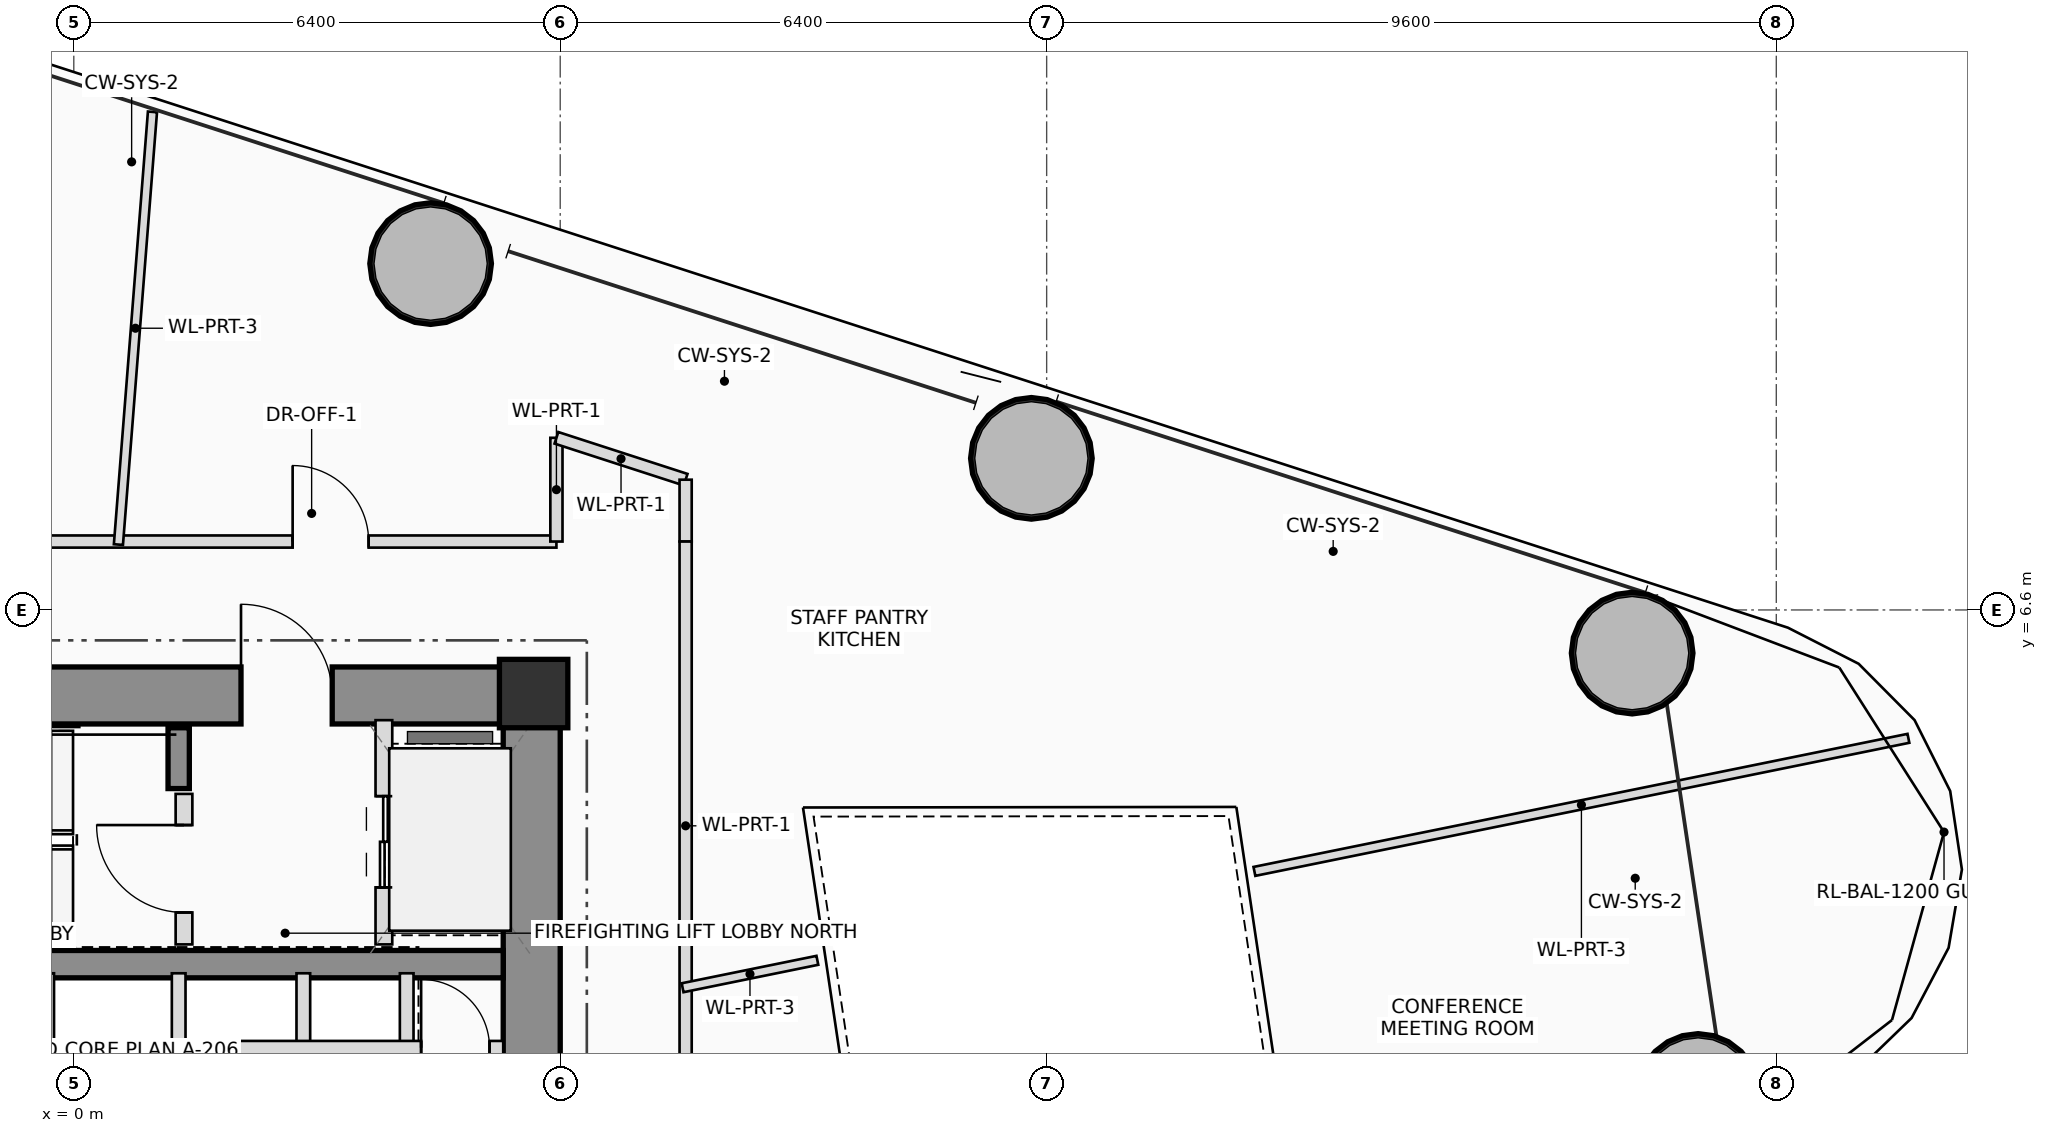
"""IFC4 building model, lengths in metres.
Left out: names, types, materials, properties, quantities, classifications, styles, units other than length and angle.
Written with IfcOpenShell. Run it as: python <this file> out.ifc"""

import sys

from ifc_helpers import new_model, si_unit, direction, frame, frame_2d, origin, origin_2d, place, context, subcontext, project, spatial, rectangle, hollow_circle, extrude, source, transform, mapped, element, fill, save


model = new_model("IFC4")
c1 = context("Model", 3, precision=1e-05, world=origin(), true_north=direction((0.0, 1.0)))
c2 = subcontext(c1, "Body", "Model", "MODEL_VIEW")
j1 = project(units=[si_unit("LENGTHUNIT", "METRE"), si_unit("PLANEANGLEUNIT", "RADIAN")], contexts=[c1])
p1 = place(None, origin())
s1 = spatial("IfcSite", under=j1, at=p1, CompositionType="ELEMENT")
p2 = place(p1, origin())
s2 = spatial("IfcBuilding", under=s1, at=p2, CompositionType="ELEMENT")
p3 = place(p2, frame((0.0, 0.0, 58.55)))
s3 = spatial("IfcBuildingStorey", under=s2, at=p3, CompositionType="ELEMENT", Elevation=58.55)
m1 = source(origin(), c2, "Body", "SweptSolid", [
    extrude(rectangle(XDim=0.9, YDim=0.9, at=origin_2d()), origin(), (0.0, 0.0, 1.0), 3.75),
])
p4 = place(p3, frame((6.05, 5.5, 0.0), z_axis=(0.0, 0.0, 1.0), x_axis=(1.0, 0.0, 0.0)))
e1 = element("IfcColumn", 1, at=p4, inside=s3, PredefinedType="COLUMN", context=c2, shape_type="MappedRepresentation", body=[
    mapped(m1, transform((0.0, 0.0, 0.0), scale=1.0)),
])
p5 = place(p3, frame((-6.4, 5.475, 0.0), z_axis=(0.0, 0.0, 1.0), x_axis=(1.0, 0.0, 0.0)))
e2 = element("IfcWall", 2, at=p5, inside=s3, PredefinedType="SHEAR", context=c2, shape_type="SweptSolid", body=[
    extrude(rectangle(XDim=12.8, YDim=0.75, at=frame_2d((6.4, 0.0))), origin(), (0.0, 0.0, 1.0), 3.75),
])
p6 = place(p5, frame((8.6, 0.0, 0.0)))
e3 = element("IfcOpeningElement", 3, at=p6, cuts=e2, PredefinedType="OPENING", context=c2, shape_type="SweptSolid", body=[
    extrude(rectangle(XDim=1.2, YDim=2.2, at=frame_2d((0.6, 1.1))), frame((0.0, 0.385, 0.0), z_axis=(0.0, -1.0, 0.0), x_axis=(1.0, 0.0, 0.0)), (0.0, 0.0, 1.0), 0.77),
])
p7 = place(p3, frame((6.025, -5.1, 0.0), z_axis=(0.0, 0.0, 1.0), x_axis=(0.0, 1.0, 0.0)))
e4 = element("IfcWall", 4, at=p7, inside=s3, PredefinedType="SHEAR", context=c2, shape_type="SweptSolid", body=[
    extrude(rectangle(XDim=10.2, YDim=0.75, at=frame_2d((5.1, 0.0))), origin(), (0.0, 0.0, 1.0), 3.75),
])
p8 = place(p3, frame((-5.65, 1.94, 0.0), z_axis=(0.0, 0.0, 1.0), x_axis=(1.0, 0.0, 0.0)))
e5 = element("IfcWall", 5, at=p8, inside=s3, PredefinedType="SHEAR", context=c2, shape_type="SweptSolid", body=[
    extrude(rectangle(XDim=11.3, YDim=0.36, at=frame_2d((5.65, 0.0))), origin(), (0.0, 0.0, 1.0), 3.75),
])
p9 = place(p3, frame((1.38, 4.25, 0.0), z_axis=(0.0, 0.0, 1.0), x_axis=(0.0, 1.0, 0.0)))
e6 = element("IfcWall", 6, at=p9, inside=s3, PredefinedType="SHEAR", context=c2, shape_type="SweptSolid", body=[
    extrude(rectangle(XDim=0.8, YDim=0.28, at=frame_2d((0.4, 0.0))), origin(), (0.0, 0.0, 1.0), 3.75),
])
m2 = source(origin(), c2, "Body", "SweptSolid", [
    extrude(hollow_circle(Radius=0.8, WallThickness=0.055, at=origin_2d()), origin(), (0.0, 0.0, 1.0), 3.75),
])
for number, where, z_axis, x_axis in (
    (7, (21.371, 0.226, 0.0), (0.0, 0.0, 1.0), (1.0, 0.0, 0.0)),
    (8, (20.503, 6.032, 0.0), (0.0, 0.0, 1.0), (1.0, 0.0, 0.0)),
    (9, (12.599, 8.594, 0.0), (0.0, 0.0, 1.0), (1.0, 0.0, 0.0)),
    (10, (4.695, 11.157, 0.0), (0.0, 0.0, 1.0), (1.0, 0.0, 0.0)),
):
    element("IfcColumn", number, at=place(p3, frame(where, z_axis=z_axis, x_axis=x_axis)), inside=s3, PredefinedType="COLUMN", context=c2, shape_type="MappedRepresentation", body=[
        mapped(m2, transform((0.0, 0.0, 0.0), scale=1.0)),
    ])
p10 = place(p3, frame((1.45, 2.2, 0.0), z_axis=(0.0, 0.0, 1.0), x_axis=(0.0, 1.0, 0.0)))
e11 = element("IfcWall", 11, at=p10, inside=s3, PredefinedType="PLUMBINGWALL", context=c2, shape_type="SweptSolid", body=[
    extrude(rectangle(XDim=1.98, YDim=0.22, at=frame_2d((0.99, 0.0))), origin(), (0.0, 0.0, 1.0), 3.545),
])
p11 = place(p10, frame((0.42, 0.0, 0.0)))
e12 = element("IfcOpeningElement", 12, at=p11, cuts=e11, PredefinedType="OPENING", context=c2, shape_type="SweptSolid", body=[
    extrude(rectangle(XDim=1.15, YDim=2.15, at=frame_2d((0.575, 1.075))), frame((0.0, 0.12, 0.0), z_axis=(0.0, -1.0, 0.0), x_axis=(1.0, 0.0, 0.0)), (0.0, 0.0, 1.0), 0.24),
])
p12 = place(p3, frame((4.08, 2.2, 0.0), z_axis=(0.0, 0.0, 1.0), x_axis=(0.0, 1.0, 0.0)))
e13 = element("IfcWall", 13, at=p12, inside=s3, PredefinedType="PLUMBINGWALL", context=c2, shape_type="SweptSolid", body=[
    extrude(rectangle(XDim=2.95, YDim=0.22, at=frame_2d((1.475, 0.0))), origin(), (0.0, 0.0, 1.0), 3.545),
])
p13 = place(p12, frame((0.75, 0.0, 0.0)))
e14 = element("IfcOpeningElement", 14, at=p13, cuts=e13, PredefinedType="OPENING", context=c2, shape_type="SweptSolid", body=[
    extrude(rectangle(XDim=1.2, YDim=2.25, at=frame_2d((0.6, 1.125))), frame((0.0, 0.12, 0.0), z_axis=(0.0, -1.0, 0.0), x_axis=(1.0, 0.0, 0.0)), (0.0, 0.0, 1.0), 0.24),
])
for number, where, z_axis, x_axis in (
    (15, (-0.35, 0.84, 0.0), (0.0, 0.0, 1.0), (0.0, 1.0, 0.0)),
    (16, (1.38, 0.84, 0.0), (0.0, 0.0, 1.0), (0.0, 1.0, 0.0)),
    (17, (3.02, 0.84, 0.0), (0.0, 0.0, 1.0), (0.0, 1.0, 0.0)),
    (18, (4.38, 0.84, 0.0), (0.0, 0.0, 1.0), (0.0, 1.0, 0.0)),
):
    element("IfcWall", number, at=place(p3, frame(where, z_axis=z_axis, x_axis=x_axis)), inside=s3, PredefinedType="PLUMBINGWALL", context=c2, shape_type="SweptSolid", body=[
        extrude(rectangle(XDim=0.98, YDim=0.18, at=frame_2d((0.49, 0.0))), origin(), (0.0, 0.0, 1.0), 3.545),
    ])
p14 = place(p3, frame((-5.68, 0.84, 0.0), z_axis=(0.0, 0.0, 1.0), x_axis=(1.0, 0.0, 0.0)))
e19 = element("IfcWall", 19, at=p14, inside=s3, PredefinedType="PLUMBINGWALL", context=c2, shape_type="SweptSolid", body=[
    extrude(rectangle(XDim=11.33, YDim=0.18, at=frame_2d((5.665, 0.0))), origin(), (0.0, 0.0, 1.0), 3.545),
])
p15 = place(p14, frame((0.43, 0.0, 0.0)))
e20 = element("IfcOpeningElement", 20, at=p15, cuts=e19, PredefinedType="OPENING", context=c2, shape_type="SweptSolid", body=[
    extrude(rectangle(XDim=1.1, YDim=2.2, at=frame_2d((0.55, 1.1))), frame((0.0, 0.1, 0.0), z_axis=(0.0, -1.0, 0.0), x_axis=(1.0, 0.0, 0.0)), (0.0, 0.0, 1.0), 0.2),
])
p16 = place(p14, frame((2.13, 0.0, 0.0)))
e21 = element("IfcOpeningElement", 21, at=p16, cuts=e19, PredefinedType="OPENING", context=c2, shape_type="SweptSolid", body=[
    extrude(rectangle(XDim=1.1, YDim=2.2, at=frame_2d((0.55, 1.1))), frame((0.0, 0.1, 0.0), z_axis=(0.0, -1.0, 0.0), x_axis=(1.0, 0.0, 0.0)), (0.0, 0.0, 1.0), 0.2),
])
p17 = place(p14, frame((10.25, 0.0, 0.0)))
e22 = element("IfcOpeningElement", 22, at=p17, cuts=e19, PredefinedType="OPENING", context=c2, shape_type="SweptSolid", body=[
    extrude(rectangle(XDim=0.9, YDim=2.05, at=frame_2d((0.45, 1.025))), frame((0.0, 0.1, 0.0), z_axis=(0.0, -1.0, 0.0), x_axis=(1.0, 0.0, 0.0)), (0.0, 0.0, 1.0), 0.2),
])
p18 = place(p3, frame((-6.35, 7.5, 0.0), z_axis=(0.0, 0.0, 1.0), x_axis=(1.0, 0.0, 0.0)))
e23 = element("IfcWall", 23, at=p18, inside=s3, PredefinedType="PARTITIONING", context=c2, shape_type="SweptSolid", body=[
    extrude(rectangle(XDim=12.7, YDim=0.16, at=frame_2d((6.35, 0.0))), origin(), (0.0, 0.0, 1.0), 2.85),
])
p19 = place(p18, frame((9.229, 0.0, 0.0)))
e24 = element("IfcOpeningElement", 24, at=p19, cuts=e23, PredefinedType="OPENING", context=c2, shape_type="SweptSolid", body=[
    extrude(rectangle(XDim=1.0, YDim=2.25, at=frame_2d((0.5, 1.125))), frame((0.0, 0.09, 0.0), z_axis=(0.0, -1.0, 0.0), x_axis=(1.0, 0.0, 0.0)), (0.0, 0.0, 1.0), 0.18),
])
p20 = place(p3, frame((6.35, 7.5, 0.0), z_axis=(0.0, 0.0, 1.0), x_axis=(0.0, 1.0, 0.0)))
e25 = element("IfcWall", 25, at=p20, inside=s3, PredefinedType="PARTITIONING", context=c2, shape_type="SweptSolid", body=[
    extrude(rectangle(XDim=1.365, YDim=0.16, at=frame_2d((0.682, 0.0))), origin(), (0.0, 0.0, 1.0), 3.05),
])
p21 = place(p3, frame((6.35, 8.865, 0.0), z_axis=(0.0, 0.0, 1.0), x_axis=(0.951273733128, -0.308347668486, 0.0)))
e26 = element("IfcWall", 26, at=p21, inside=s3, PredefinedType="PARTITIONING", context=c2, shape_type="SweptSolid", body=[
    extrude(rectangle(XDim=1.787, YDim=0.16, at=frame_2d((0.894, 0.0))), origin(), (0.0, 0.0, 1.0), 3.2),
])
p22 = place(p3, frame((8.05, 8.314, 0.0), z_axis=(0.0, 0.0, 1.0), x_axis=(0.0, -1.0, 0.0)))
e27 = element("IfcWall", 27, at=p22, inside=s3, PredefinedType="PARTITIONING", context=c2, shape_type="SweptSolid", body=[
    extrude(rectangle(XDim=0.814, YDim=0.16, at=frame_2d((0.407, 0.0))), origin(), (0.0, 0.0, 1.0), 3.05),
])
p23 = place(p3, frame((8.05, 7.5, 0.0), z_axis=(0.0, 0.0, 1.0), x_axis=(0.0, -1.0, 0.0)))
e28 = element("IfcWall", 28, at=p23, inside=s3, PredefinedType="PARTITIONING", context=c2, shape_type="SweptSolid", body=[
    extrude(rectangle(XDim=7.48, YDim=0.16, at=frame_2d((3.74, 0.0))), origin(), (0.0, 0.0, 1.0), 2.85),
])
p24 = place(p3, frame((0.587, 7.46, 0.0), z_axis=(0.0, 0.0, 1.0), x_axis=(0.078455369282, 0.996917627004, 0.0)))
e29 = element("IfcWall", 29, at=p24, inside=s3, PredefinedType="PARTITIONING", context=c2, shape_type="SweptSolid", body=[
    extrude(rectangle(XDim=5.71, YDim=0.12, at=frame_2d((2.855, 0.0))), origin(), (0.0, 0.0, 1.0), 3.01),
])
p25 = place(p3, frame((8.01, 1.63, 0.0), z_axis=(0.0, 0.0, 1.0), x_axis=(0.979916112173, 0.199410162989, 0.0)))
e30 = element("IfcWall", 30, at=p25, inside=s3, PredefinedType="PARTITIONING", context=c2, shape_type="SweptSolid", body=[
    extrude(rectangle(XDim=1.81, YDim=0.12, at=frame_2d((0.905, 0.0))), origin(), (0.0, 0.0, 1.0), 3.21),
])
p26 = place(p3, frame((15.533, 3.16, 0.0), z_axis=(0.0, 0.0, 1.0), x_axis=(0.979928377953, 0.199349878562, 0.0)))
e31 = element("IfcWall", 31, at=p26, inside=s3, PredefinedType="PARTITIONING", context=c2, shape_type="SweptSolid", body=[
    extrude(rectangle(XDim=8.781, YDim=0.12, at=frame_2d((4.391, 0.0))), origin(), (0.0, 0.0, 1.0), 3.01),
])
p27 = place(p6, origin())
e32 = element("IfcDoor", 32, at=p27, inside=s3, OperationType="SINGLE_SWING_LEFT", PredefinedType="DOOR", context=c2, shape_type="SweptSolid", body=[
    extrude(rectangle(XDim=1.2, YDim=2.2, at=frame_2d((0.6, 1.1))), frame((0.0, 0.025, 0.0), z_axis=(0.0, -1.0, 0.0), x_axis=(1.0, 0.0, 0.0)), (0.0, 0.0, 1.0), 0.05),
])
fill(e3, e32)
p28 = place(p11, origin())
e33 = element("IfcDoor", 33, at=p28, inside=s3, OperationType="SINGLE_SWING_RIGHT", PredefinedType="DOOR", context=c2, shape_type="SweptSolid", body=[
    extrude(rectangle(XDim=1.15, YDim=2.15, at=frame_2d((0.575, 1.075))), frame((0.0, 0.025, 0.0), z_axis=(0.0, -1.0, 0.0), x_axis=(1.0, 0.0, 0.0)), (0.0, 0.0, 1.0), 0.05),
])
fill(e12, e33)
p29 = place(p13, origin())
e34 = element("IfcDoor", 34, at=p29, inside=s3, OperationType="DOUBLE_DOOR_SLIDING", PredefinedType="DOOR", context=c2, shape_type="SweptSolid", body=[
    extrude(rectangle(XDim=1.2, YDim=2.25, at=frame_2d((0.6, 1.125))), frame((0.0, 0.025, 0.0), z_axis=(0.0, -1.0, 0.0), x_axis=(1.0, 0.0, 0.0)), (0.0, 0.0, 1.0), 0.05),
])
fill(e14, e34)
p30 = place(p17, origin())
e35 = element("IfcDoor", 35, at=p30, inside=s3, OperationType="SINGLE_SWING_LEFT", PredefinedType="DOOR", context=c2, shape_type="SweptSolid", body=[
    extrude(rectangle(XDim=0.9, YDim=2.05, at=frame_2d((0.45, 1.025))), frame((0.0, 0.025, 0.0), z_axis=(0.0, -1.0, 0.0), x_axis=(1.0, 0.0, 0.0)), (0.0, 0.0, 1.0), 0.05),
])
fill(e22, e35)
p31 = place(p19, origin())
e36 = element("IfcDoor", 36, at=p31, inside=s3, OperationType="SINGLE_SWING_LEFT", PredefinedType="DOOR", context=c2, shape_type="SweptSolid", body=[
    extrude(rectangle(XDim=1.0, YDim=2.25, at=frame_2d((0.5, 1.125))), frame((0.0, 0.025, 0.0), z_axis=(0.0, -1.0, 0.0), x_axis=(1.0, 0.0, 0.0)), (0.0, 0.0, 1.0), 0.05),
])
fill(e24, e36)
save(model, sys.argv[1])
